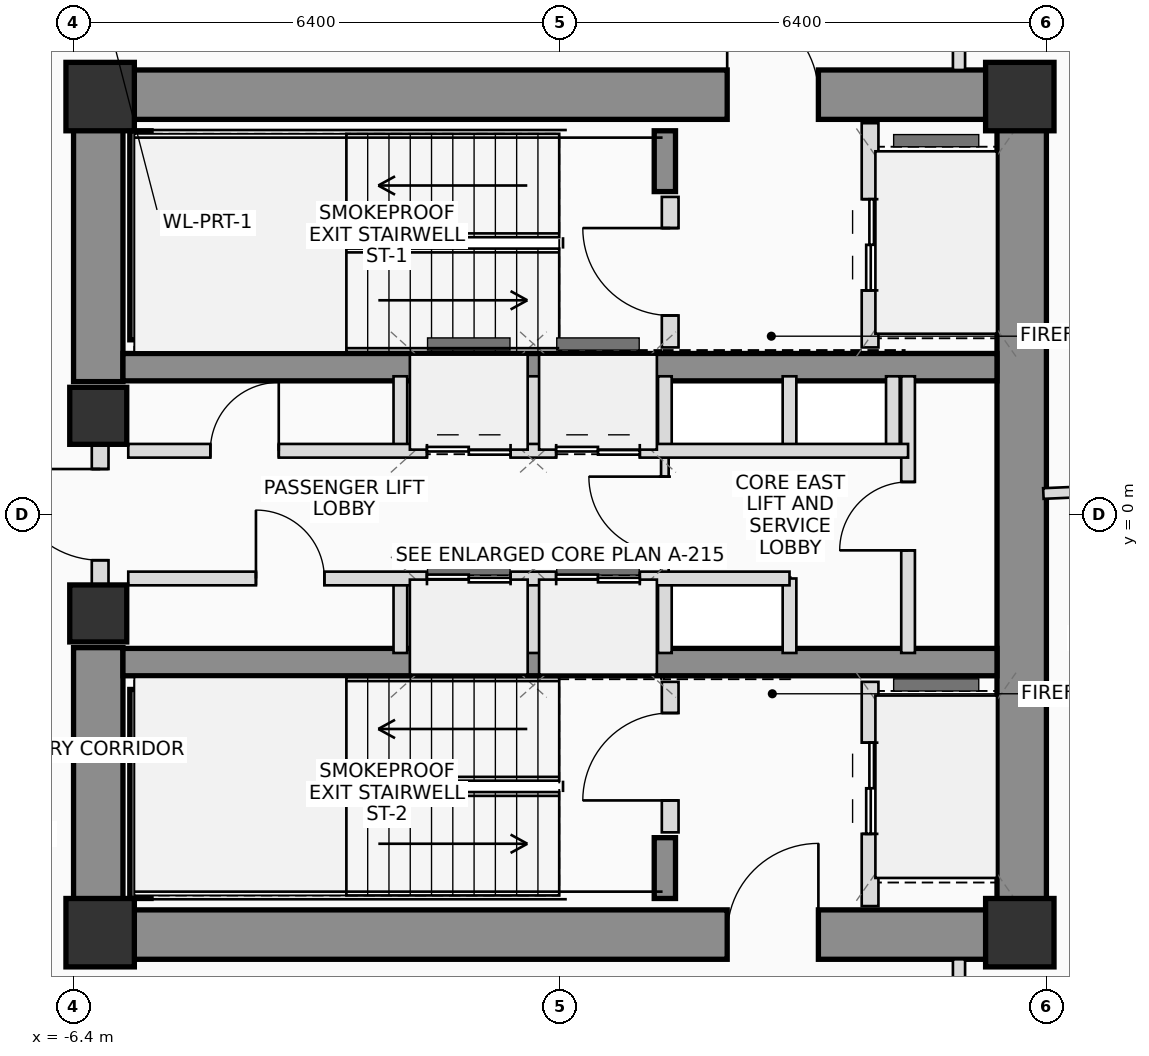
"""IFC4 building model, lengths in metres.
Left out: names, types, materials, properties, quantities, classifications, styles, units other than length and angle.
Written with IfcOpenShell. Run it as: python <this file> out.ifc"""

import sys

from ifc_helpers import new_model, si_unit, direction, frame, frame_2d, origin, origin_2d, place, context, subcontext, project, spatial, rectangle, extrude, source, transform, mapped, element, fill, save


model = new_model("IFC4")
c1 = context("Model", 3, precision=1e-05, world=origin(), true_north=direction((0.0, 1.0)))
c2 = subcontext(c1, "Body", "Model", "MODEL_VIEW")
j1 = project(units=[si_unit("LENGTHUNIT", "METRE"), si_unit("PLANEANGLEUNIT", "RADIAN")], contexts=[c1])
p1 = place(None, origin())
s1 = spatial("IfcSite", under=j1, at=p1, CompositionType="ELEMENT")
p2 = place(p1, origin())
s2 = spatial("IfcBuilding", under=s1, at=p2, CompositionType="ELEMENT")
p3 = place(p2, frame((0.0, 0.0, 158.75)))
s3 = spatial("IfcBuildingStorey", under=s2, at=p3, CompositionType="ELEMENT", Elevation=158.75)
m1 = source(origin(), c2, "Body", "SweptSolid", [
    extrude(rectangle(XDim=0.9, YDim=0.9, at=origin_2d()), origin(), (0.0, 0.0, 1.0), 3.45),
])
for number, where, z_axis, x_axis in (
    (1, (-6.05, -5.5, 0.0), (0.0, 0.0, 1.0), (1.0, 0.0, 0.0)),
    (2, (6.05, -5.5, 0.0), (0.0, 0.0, 1.0), (1.0, 0.0, 0.0)),
    (3, (6.05, 5.5, 0.0), (0.0, 0.0, 1.0), (1.0, 0.0, 0.0)),
    (4, (-6.05, 5.5, 0.0), (0.0, 0.0, 1.0), (1.0, 0.0, 0.0)),
):
    element("IfcColumn", number, at=place(p3, frame(where, z_axis=z_axis, x_axis=x_axis)), inside=s3, PredefinedType="COLUMN", context=c2, shape_type="MappedRepresentation", body=[
        mapped(m1, transform((0.0, 0.0, 0.0), scale=1.0)),
    ])
p4 = place(p3, frame((-6.4, 5.525, 0.0), z_axis=(0.0, 0.0, 1.0), x_axis=(1.0, 0.0, 0.0)))
e5 = element("IfcWall", 5, at=p4, inside=s3, PredefinedType="SHEAR", context=c2, shape_type="SweptSolid", body=[
    extrude(rectangle(XDim=12.8, YDim=0.65, at=frame_2d((6.4, 0.0))), origin(), (0.0, 0.0, 1.0), 3.45),
])
p5 = place(p4, frame((8.6, 0.0, 0.0)))
e6 = element("IfcOpeningElement", 6, at=p5, cuts=e5, PredefinedType="OPENING", context=c2, shape_type="SweptSolid", body=[
    extrude(rectangle(XDim=1.2, YDim=2.2, at=frame_2d((0.6, 1.1))), frame((0.0, 0.335, 0.0), z_axis=(0.0, -1.0, 0.0), x_axis=(1.0, 0.0, 0.0)), (0.0, 0.0, 1.0), 0.67),
])
p6 = place(p3, frame((-6.4, -5.525, 0.0), z_axis=(0.0, 0.0, 1.0), x_axis=(1.0, 0.0, 0.0)))
e7 = element("IfcWall", 7, at=p6, inside=s3, PredefinedType="SHEAR", context=c2, shape_type="SweptSolid", body=[
    extrude(rectangle(XDim=12.8, YDim=0.65, at=frame_2d((6.4, 0.0))), origin(), (0.0, 0.0, 1.0), 3.45),
])
p7 = place(p6, frame((8.6, 0.0, 0.0)))
e8 = element("IfcOpeningElement", 8, at=p7, cuts=e7, PredefinedType="OPENING", context=c2, shape_type="SweptSolid", body=[
    extrude(rectangle(XDim=1.2, YDim=2.2, at=frame_2d((0.6, 1.1))), frame((0.0, 0.335, 0.0), z_axis=(0.0, -1.0, 0.0), x_axis=(1.0, 0.0, 0.0)), (0.0, 0.0, 1.0), 0.67),
])
p8 = place(p3, frame((6.075, -5.2, 0.0), z_axis=(0.0, 0.0, 1.0), x_axis=(0.0, 1.0, 0.0)))
e9 = element("IfcWall", 9, at=p8, inside=s3, PredefinedType="SHEAR", context=c2, shape_type="SweptSolid", body=[
    extrude(rectangle(XDim=10.4, YDim=0.65, at=frame_2d((5.2, 0.0))), origin(), (0.0, 0.0, 1.0), 3.45),
])
for number, where, z_axis, x_axis in (
    (10, (-6.075, -5.2, 0.0), (0.0, 0.0, 1.0), (0.0, 1.0, 0.0)),
    (11, (-6.075, 1.75, 0.0), (0.0, 0.0, 1.0), (0.0, 1.0, 0.0)),
):
    element("IfcWall", number, at=place(p3, frame(where, z_axis=z_axis, x_axis=x_axis)), inside=s3, PredefinedType="SHEAR", context=c2, shape_type="SweptSolid", body=[
        extrude(rectangle(XDim=3.45, YDim=0.65, at=frame_2d((1.725, 0.0))), origin(), (0.0, 0.0, 1.0), 3.45),
    ])
for number, where, z_axis, x_axis in (
    (12, (-5.75, 1.94, 0.0), (0.0, 0.0, 1.0), (1.0, 0.0, 0.0)),
    (13, (-5.75, -1.94, 0.0), (0.0, 0.0, 1.0), (1.0, 0.0, 0.0)),
):
    element("IfcWall", number, at=place(p3, frame(where, z_axis=z_axis, x_axis=x_axis)), inside=s3, PredefinedType="SHEAR", context=c2, shape_type="SweptSolid", body=[
        extrude(rectangle(XDim=11.5, YDim=0.36, at=frame_2d((5.75, 0.0))), origin(), (0.0, 0.0, 1.0), 3.45),
    ])
p9 = place(p3, frame((-5.52, 2.3, 0.0), z_axis=(0.0, 0.0, 1.0), x_axis=(0.0, 1.0, 0.0)))
e14 = element("IfcWall", 14, at=p9, inside=s3, PredefinedType="SHEAR", context=c2, shape_type="SweptSolid", body=[
    extrude(rectangle(XDim=2.75, YDim=0.28, at=frame_2d((1.375, 0.0))), origin(), (0.0, 0.0, 1.0), 3.45),
])
p10 = place(p3, frame((1.38, 4.25, 0.0), z_axis=(0.0, 0.0, 1.0), x_axis=(0.0, 1.0, 0.0)))
e15 = element("IfcWall", 15, at=p10, inside=s3, PredefinedType="SHEAR", context=c2, shape_type="SweptSolid", body=[
    extrude(rectangle(XDim=0.8, YDim=0.28, at=frame_2d((0.4, 0.0))), origin(), (0.0, 0.0, 1.0), 3.45),
])
p11 = place(p3, frame((-5.52, -5.05, 0.0), z_axis=(0.0, 0.0, 1.0), x_axis=(0.0, 1.0, 0.0)))
e16 = element("IfcWall", 16, at=p11, inside=s3, PredefinedType="SHEAR", context=c2, shape_type="SweptSolid", body=[
    extrude(rectangle(XDim=2.75, YDim=0.28, at=frame_2d((1.375, 0.0))), origin(), (0.0, 0.0, 1.0), 3.45),
])
p12 = place(p3, frame((1.38, -5.05, 0.0), z_axis=(0.0, 0.0, 1.0), x_axis=(0.0, 1.0, 0.0)))
e17 = element("IfcWall", 17, at=p12, inside=s3, PredefinedType="SHEAR", context=c2, shape_type="SweptSolid", body=[
    extrude(rectangle(XDim=0.8, YDim=0.28, at=frame_2d((0.4, 0.0))), origin(), (0.0, 0.0, 1.0), 3.45),
])
m2 = source(origin(), c2, "Body", "SweptSolid", [
    extrude(rectangle(XDim=0.75, YDim=0.75, at=origin_2d()), origin(), (0.0, 0.0, 1.0), 3.45),
])
for number, where, z_axis, x_axis in (
    (18, (-6.075, -1.3, 0.0), (0.0, 0.0, 1.0), (1.0, 0.0, 0.0)),
    (19, (-6.075, 1.3, 0.0), (0.0, 0.0, 1.0), (1.0, 0.0, 0.0)),
):
    element("IfcColumn", number, at=place(p3, frame(where, z_axis=z_axis, x_axis=x_axis)), inside=s3, PredefinedType="COLUMN", context=c2, shape_type="MappedRepresentation", body=[
        mapped(m2, transform((0.0, 0.0, 0.0), scale=1.0)),
    ])
p13 = place(p3, frame((-6.05, -0.95, 0.0), z_axis=(0.0, 0.0, 1.0), x_axis=(0.0, 1.0, 0.0)))
e20 = element("IfcWall", 20, at=p13, inside=s3, PredefinedType="PLUMBINGWALL", context=c2, shape_type="SweptSolid", body=[
    extrude(rectangle(XDim=1.9, YDim=0.22, at=frame_2d((0.95, 0.0))), origin(), (0.0, 0.0, 1.0), 2.23),
])
p14 = place(p13, frame((0.35, 0.0, 0.0)))
e21 = element("IfcOpeningElement", 21, at=p14, cuts=e20, PredefinedType="OPENING", context=c2, shape_type="SweptSolid", body=[
    extrude(rectangle(XDim=1.2, YDim=2.2, at=frame_2d((0.6, 1.1))), frame((0.0, 0.12, 0.0), z_axis=(0.0, -1.0, 0.0), x_axis=(1.0, 0.0, 0.0)), (0.0, 0.0, 1.0), 0.24),
])
p15 = place(p3, frame((1.45, 2.2, 0.0), z_axis=(0.0, 0.0, 1.0), x_axis=(0.0, 1.0, 0.0)))
e22 = element("IfcWall", 22, at=p15, inside=s3, PredefinedType="PLUMBINGWALL", context=c2, shape_type="SweptSolid", body=[
    extrude(rectangle(XDim=1.98, YDim=0.22, at=frame_2d((0.99, 0.0))), origin(), (0.0, 0.0, 1.0), 3.25),
])
p16 = place(p15, frame((0.42, 0.0, 0.0)))
e23 = element("IfcOpeningElement", 23, at=p16, cuts=e22, PredefinedType="OPENING", context=c2, shape_type="SweptSolid", body=[
    extrude(rectangle(XDim=1.15, YDim=2.15, at=frame_2d((0.575, 1.075))), frame((0.0, 0.12, 0.0), z_axis=(0.0, -1.0, 0.0), x_axis=(1.0, 0.0, 0.0)), (0.0, 0.0, 1.0), 0.24),
])
p17 = place(p3, frame((4.08, 2.2, 0.0), z_axis=(0.0, 0.0, 1.0), x_axis=(0.0, 1.0, 0.0)))
e24 = element("IfcWall", 24, at=p17, inside=s3, PredefinedType="PLUMBINGWALL", context=c2, shape_type="SweptSolid", body=[
    extrude(rectangle(XDim=2.95, YDim=0.22, at=frame_2d((1.475, 0.0))), origin(), (0.0, 0.0, 1.0), 3.25),
])
p18 = place(p17, frame((0.75, 0.0, 0.0)))
e25 = element("IfcOpeningElement", 25, at=p18, cuts=e24, PredefinedType="OPENING", context=c2, shape_type="SweptSolid", body=[
    extrude(rectangle(XDim=1.2, YDim=2.25, at=frame_2d((0.6, 1.125))), frame((0.0, 0.12, 0.0), z_axis=(0.0, -1.0, 0.0), x_axis=(1.0, 0.0, 0.0)), (0.0, 0.0, 1.0), 0.24),
])
p19 = place(p3, frame((1.45, -4.18, 0.0), z_axis=(0.0, 0.0, 1.0), x_axis=(0.0, 1.0, 0.0)))
e26 = element("IfcWall", 26, at=p19, inside=s3, PredefinedType="PLUMBINGWALL", context=c2, shape_type="SweptSolid", body=[
    extrude(rectangle(XDim=1.98, YDim=0.22, at=frame_2d((0.99, 0.0))), origin(), (0.0, 0.0, 1.0), 3.25),
])
p20 = place(p19, frame((0.42, 0.0, 0.0)))
e27 = element("IfcOpeningElement", 27, at=p20, cuts=e26, PredefinedType="OPENING", context=c2, shape_type="SweptSolid", body=[
    extrude(rectangle(XDim=1.15, YDim=2.15, at=frame_2d((0.575, 1.075))), frame((0.0, 0.12, 0.0), z_axis=(0.0, -1.0, 0.0), x_axis=(1.0, 0.0, 0.0)), (0.0, 0.0, 1.0), 0.24),
])
p21 = place(p3, frame((4.08, -5.15, 0.0), z_axis=(0.0, 0.0, 1.0), x_axis=(0.0, 1.0, 0.0)))
e28 = element("IfcWall", 28, at=p21, inside=s3, PredefinedType="PLUMBINGWALL", context=c2, shape_type="SweptSolid", body=[
    extrude(rectangle(XDim=2.95, YDim=0.22, at=frame_2d((1.475, 0.0))), origin(), (0.0, 0.0, 1.0), 3.25),
])
p22 = place(p21, frame((0.95, 0.0, 0.0)))
e29 = element("IfcOpeningElement", 29, at=p22, cuts=e28, PredefinedType="OPENING", context=c2, shape_type="SweptSolid", body=[
    extrude(rectangle(XDim=1.2, YDim=2.25, at=frame_2d((0.6, 1.125))), frame((0.0, 0.12, 0.0), z_axis=(0.0, -1.0, 0.0), x_axis=(1.0, 0.0, 0.0)), (0.0, 0.0, 1.0), 0.24),
])
p23 = place(p3, frame((1.38, -0.84, 0.0), z_axis=(0.0, 0.0, 1.0), x_axis=(0.0, 1.0, 0.0)))
e30 = element("IfcWall", 30, at=p23, inside=s3, PredefinedType="PARTITIONING", context=c2, shape_type="SweptSolid", body=[
    extrude(rectangle(XDim=1.68, YDim=0.1, at=frame_2d((0.84, 0.0))), origin(), (0.0, 0.0, 1.0), 3.25),
])
p24 = place(p23, frame((0.34, 0.0, 0.0)))
e31 = element("IfcOpeningElement", 31, at=p24, cuts=e30, PredefinedType="OPENING", context=c2, shape_type="SweptSolid", body=[
    extrude(rectangle(XDim=1.0, YDim=2.25, at=frame_2d((0.5, 1.125))), frame((0.0, 0.06, 0.0), z_axis=(0.0, -1.0, 0.0), x_axis=(1.0, 0.0, 0.0)), (0.0, 0.0, 1.0), 0.12),
])
for number, where, z_axis, x_axis in (
    (32, (-2.1, 0.84, 0.0), (0.0, 0.0, 1.0), (0.0, 1.0, 0.0)),
    (33, (-2.1, -1.82, 0.0), (0.0, 0.0, 1.0), (0.0, 1.0, 0.0)),
    (34, (-0.35, 0.84, 0.0), (0.0, 0.0, 1.0), (0.0, 1.0, 0.0)),
    (35, (-0.35, -1.82, 0.0), (0.0, 0.0, 1.0), (0.0, 1.0, 0.0)),
    (36, (1.38, 0.84, 0.0), (0.0, 0.0, 1.0), (0.0, 1.0, 0.0)),
    (37, (1.38, -1.82, 0.0), (0.0, 0.0, 1.0), (0.0, 1.0, 0.0)),
    (38, (3.02, 0.84, 0.0), (0.0, 0.0, 1.0), (0.0, 1.0, 0.0)),
    (39, (4.38, 0.84, 0.0), (0.0, 0.0, 1.0), (0.0, 1.0, 0.0)),
    (40, (3.02, -1.82, 0.0), (0.0, 0.0, 1.0), (0.0, 1.0, 0.0)),
):
    element("IfcWall", number, at=place(p3, frame(where, z_axis=z_axis, x_axis=x_axis)), inside=s3, PredefinedType="PLUMBINGWALL", context=c2, shape_type="SweptSolid", body=[
        extrude(rectangle(XDim=0.98, YDim=0.18, at=frame_2d((0.49, 0.0))), origin(), (0.0, 0.0, 1.0), 3.25),
    ])
p25 = place(p3, frame((4.58, -1.82, 0.0), z_axis=(0.0, 0.0, 1.0), x_axis=(0.0, 1.0, 0.0)))
e41 = element("IfcWall", 41, at=p25, inside=s3, PredefinedType="PLUMBINGWALL", context=c2, shape_type="SweptSolid", body=[
    extrude(rectangle(XDim=3.64, YDim=0.18, at=frame_2d((1.82, 0.0))), origin(), (0.0, 0.0, 1.0), 3.25),
])
p26 = place(p25, frame((1.35, 0.0, 0.0)))
e42 = element("IfcOpeningElement", 42, at=p26, cuts=e41, PredefinedType="OPENING", context=c2, shape_type="SweptSolid", body=[
    extrude(rectangle(XDim=0.9, YDim=2.05, at=frame_2d((0.45, 1.025))), frame((0.0, 0.1, 0.0), z_axis=(0.0, -1.0, 0.0), x_axis=(1.0, 0.0, 0.0)), (0.0, 0.0, 1.0), 0.2),
])
p27 = place(p3, frame((-5.68, 0.84, 0.0), z_axis=(0.0, 0.0, 1.0), x_axis=(1.0, 0.0, 0.0)))
e43 = element("IfcWall", 43, at=p27, inside=s3, PredefinedType="PLUMBINGWALL", context=c2, shape_type="SweptSolid", body=[
    extrude(rectangle(XDim=10.26, YDim=0.18, at=frame_2d((5.13, 0.0))), origin(), (0.0, 0.0, 1.0), 3.25),
])
p28 = place(p27, frame((1.08, 0.0, 0.0)))
e44 = element("IfcOpeningElement", 44, at=p28, cuts=e43, PredefinedType="OPENING", context=c2, shape_type="SweptSolid", body=[
    extrude(rectangle(XDim=0.9, YDim=2.05, at=frame_2d((0.45, 1.025))), frame((0.0, 0.1, 0.0), z_axis=(0.0, -1.0, 0.0), x_axis=(1.0, 0.0, 0.0)), (0.0, 0.0, 1.0), 0.2),
])
p29 = place(p27, frame((3.93, 0.0, 0.0)))
e45 = element("IfcOpeningElement", 45, at=p29, cuts=e43, PredefinedType="OPENING", context=c2, shape_type="SweptSolid", body=[
    extrude(rectangle(XDim=1.1, YDim=2.2, at=frame_2d((0.55, 1.1))), frame((0.0, 0.1, 0.0), z_axis=(0.0, -1.0, 0.0), x_axis=(1.0, 0.0, 0.0)), (0.0, 0.0, 1.0), 0.2),
])
p30 = place(p27, frame((5.63, 0.0, 0.0)))
e46 = element("IfcOpeningElement", 46, at=p30, cuts=e43, PredefinedType="OPENING", context=c2, shape_type="SweptSolid", body=[
    extrude(rectangle(XDim=1.1, YDim=2.2, at=frame_2d((0.55, 1.1))), frame((0.0, 0.1, 0.0), z_axis=(0.0, -1.0, 0.0), x_axis=(1.0, 0.0, 0.0)), (0.0, 0.0, 1.0), 0.2),
])
p31 = place(p3, frame((-5.68, -0.84, 0.0), z_axis=(0.0, 0.0, 1.0), x_axis=(1.0, 0.0, 0.0)))
e47 = element("IfcWall", 47, at=p31, inside=s3, PredefinedType="PLUMBINGWALL", context=c2, shape_type="SweptSolid", body=[
    extrude(rectangle(XDim=8.7, YDim=0.18, at=frame_2d((4.35, 0.0))), origin(), (0.0, 0.0, 1.0), 3.25),
])
p32 = place(p31, frame((1.68, 0.0, 0.0)))
e48 = element("IfcOpeningElement", 48, at=p32, cuts=e47, PredefinedType="OPENING", context=c2, shape_type="SweptSolid", body=[
    extrude(rectangle(XDim=0.9, YDim=2.05, at=frame_2d((0.45, 1.025))), frame((0.0, 0.1, 0.0), z_axis=(0.0, -1.0, 0.0), x_axis=(1.0, 0.0, 0.0)), (0.0, 0.0, 1.0), 0.2),
])
p33 = place(p31, frame((3.93, 0.0, 0.0)))
e49 = element("IfcOpeningElement", 49, at=p33, cuts=e47, PredefinedType="OPENING", context=c2, shape_type="SweptSolid", body=[
    extrude(rectangle(XDim=1.1, YDim=2.2, at=frame_2d((0.55, 1.1))), frame((0.0, 0.1, 0.0), z_axis=(0.0, -1.0, 0.0), x_axis=(1.0, 0.0, 0.0)), (0.0, 0.0, 1.0), 0.2),
])
p34 = place(p31, frame((5.63, 0.0, 0.0)))
e50 = element("IfcOpeningElement", 50, at=p34, cuts=e47, PredefinedType="OPENING", context=c2, shape_type="SweptSolid", body=[
    extrude(rectangle(XDim=1.1, YDim=2.2, at=frame_2d((0.55, 1.1))), frame((0.0, 0.1, 0.0), z_axis=(0.0, -1.0, 0.0), x_axis=(1.0, 0.0, 0.0)), (0.0, 0.0, 1.0), 0.2),
])
for number, where, z_axis, x_axis in (
    (51, (5.25, 7.5, 0.0), (0.0, 0.0, 1.0), (0.0, -1.0, 0.0)),
    (52, (5.25, -5.85, 0.0), (0.0, 0.0, 1.0), (0.0, -1.0, 0.0)),
):
    element("IfcWall", number, at=place(p3, frame(where, z_axis=z_axis, x_axis=x_axis)), inside=s3, PredefinedType="PARTITIONING", context=c2, shape_type="SweptSolid", body=[
        extrude(rectangle(XDim=1.65, YDim=0.16, at=frame_2d((0.825, 0.0))), origin(), (0.0, 0.0, 1.0), 3.25),
    ])
p35 = place(p3, frame((6.36, 0.278, 0.0), z_axis=(0.0, 0.0, 1.0), x_axis=(0.999047543566, 0.043634913719, 0.0)))
e53 = element("IfcWall", 53, at=p35, inside=s3, PredefinedType="PARTITIONING", context=c2, shape_type="SweptSolid", body=[
    extrude(rectangle(XDim=7.503, YDim=0.14, at=frame_2d((3.751, 0.0))), origin(), (0.0, 0.0, 1.0), 2.605),
])
p36 = place(p5, origin())
e54 = element("IfcDoor", 54, at=p36, inside=s3, OperationType="SINGLE_SWING_LEFT", PredefinedType="DOOR", context=c2, shape_type="SweptSolid", body=[
    extrude(rectangle(XDim=1.2, YDim=2.2, at=frame_2d((0.6, 1.1))), frame((0.0, 0.025, 0.0), z_axis=(0.0, -1.0, 0.0), x_axis=(1.0, 0.0, 0.0)), (0.0, 0.0, 1.0), 0.05),
])
fill(e6, e54)
p37 = place(p7, origin())
e55 = element("IfcDoor", 55, at=p37, inside=s3, OperationType="SINGLE_SWING_RIGHT", PredefinedType="DOOR", context=c2, shape_type="SweptSolid", body=[
    extrude(rectangle(XDim=1.2, YDim=2.2, at=frame_2d((0.6, 1.1))), frame((0.0, 0.025, 0.0), z_axis=(0.0, -1.0, 0.0), x_axis=(1.0, 0.0, 0.0)), (0.0, 0.0, 1.0), 0.05),
])
fill(e8, e55)
p38 = place(p14, origin())
e56 = element("IfcDoor", 56, at=p38, inside=s3, OperationType="SINGLE_SWING_RIGHT", PredefinedType="DOOR", context=c2, shape_type="SweptSolid", body=[
    extrude(rectangle(XDim=1.2, YDim=2.2, at=frame_2d((0.6, 1.1))), frame((0.0, 0.025, 0.0), z_axis=(0.0, -1.0, 0.0), x_axis=(1.0, 0.0, 0.0)), (0.0, 0.0, 1.0), 0.05),
])
fill(e21, e56)
p39 = place(p16, origin())
e57 = element("IfcDoor", 57, at=p39, inside=s3, OperationType="SINGLE_SWING_RIGHT", PredefinedType="DOOR", context=c2, shape_type="SweptSolid", body=[
    extrude(rectangle(XDim=1.15, YDim=2.15, at=frame_2d((0.575, 1.075))), frame((0.0, 0.025, 0.0), z_axis=(0.0, -1.0, 0.0), x_axis=(1.0, 0.0, 0.0)), (0.0, 0.0, 1.0), 0.05),
])
fill(e23, e57)
p40 = place(p18, origin())
e58 = element("IfcDoor", 58, at=p40, inside=s3, OperationType="DOUBLE_DOOR_SLIDING", PredefinedType="DOOR", context=c2, shape_type="SweptSolid", body=[
    extrude(rectangle(XDim=1.2, YDim=2.25, at=frame_2d((0.6, 1.125))), frame((0.0, 0.025, 0.0), z_axis=(0.0, -1.0, 0.0), x_axis=(1.0, 0.0, 0.0)), (0.0, 0.0, 1.0), 0.05),
])
fill(e25, e58)
p41 = place(p20, origin())
e59 = element("IfcDoor", 59, at=p41, inside=s3, OperationType="SINGLE_SWING_LEFT", PredefinedType="DOOR", context=c2, shape_type="SweptSolid", body=[
    extrude(rectangle(XDim=1.15, YDim=2.15, at=frame_2d((0.575, 1.075))), frame((0.0, 0.025, 0.0), z_axis=(0.0, -1.0, 0.0), x_axis=(1.0, 0.0, 0.0)), (0.0, 0.0, 1.0), 0.05),
])
fill(e27, e59)
p42 = place(p22, origin())
e60 = element("IfcDoor", 60, at=p42, inside=s3, OperationType="DOUBLE_DOOR_SLIDING", PredefinedType="DOOR", context=c2, shape_type="SweptSolid", body=[
    extrude(rectangle(XDim=1.2, YDim=2.25, at=frame_2d((0.6, 1.125))), frame((0.0, 0.025, 0.0), z_axis=(0.0, -1.0, 0.0), x_axis=(1.0, 0.0, 0.0)), (0.0, 0.0, 1.0), 0.05),
])
fill(e29, e60)
p43 = place(p24, origin())
e61 = element("IfcDoor", 61, at=p43, inside=s3, OperationType="SINGLE_SWING_RIGHT", PredefinedType="DOOR", context=c2, shape_type="SweptSolid", body=[
    extrude(rectangle(XDim=1.0, YDim=2.25, at=frame_2d((0.5, 1.125))), frame((0.0, 0.025, 0.0), z_axis=(0.0, -1.0, 0.0), x_axis=(1.0, 0.0, 0.0)), (0.0, 0.0, 1.0), 0.05),
])
fill(e31, e61)
p44 = place(p26, origin())
e62 = element("IfcDoor", 62, at=p44, inside=s3, OperationType="SINGLE_SWING_LEFT", PredefinedType="DOOR", context=c2, shape_type="SweptSolid", body=[
    extrude(rectangle(XDim=0.9, YDim=2.05, at=frame_2d((0.45, 1.025))), frame((0.0, 0.025, 0.0), z_axis=(0.0, -1.0, 0.0), x_axis=(1.0, 0.0, 0.0)), (0.0, 0.0, 1.0), 0.05),
])
fill(e42, e62)
p45 = place(p28, origin())
e63 = element("IfcDoor", 63, at=p45, inside=s3, OperationType="SINGLE_SWING_RIGHT", PredefinedType="DOOR", context=c2, shape_type="SweptSolid", body=[
    extrude(rectangle(XDim=0.9, YDim=2.05, at=frame_2d((0.45, 1.025))), frame((0.0, 0.025, 0.0), z_axis=(0.0, -1.0, 0.0), x_axis=(1.0, 0.0, 0.0)), (0.0, 0.0, 1.0), 0.05),
])
fill(e44, e63)
p46 = place(p29, origin())
e64 = element("IfcDoor", 64, at=p46, inside=s3, OperationType="DOUBLE_DOOR_SLIDING", PredefinedType="DOOR", context=c2, shape_type="SweptSolid", body=[
    extrude(rectangle(XDim=1.1, YDim=2.2, at=frame_2d((0.55, 1.1))), frame((0.0, 0.025, 0.0), z_axis=(0.0, -1.0, 0.0), x_axis=(1.0, 0.0, 0.0)), (0.0, 0.0, 1.0), 0.05),
])
fill(e45, e64)
p47 = place(p30, origin())
e65 = element("IfcDoor", 65, at=p47, inside=s3, OperationType="DOUBLE_DOOR_SLIDING", PredefinedType="DOOR", context=c2, shape_type="SweptSolid", body=[
    extrude(rectangle(XDim=1.1, YDim=2.2, at=frame_2d((0.55, 1.1))), frame((0.0, 0.025, 0.0), z_axis=(0.0, -1.0, 0.0), x_axis=(1.0, 0.0, 0.0)), (0.0, 0.0, 1.0), 0.05),
])
fill(e46, e65)
p48 = place(p32, origin())
e66 = element("IfcDoor", 66, at=p48, inside=s3, OperationType="SINGLE_SWING_LEFT", PredefinedType="DOOR", context=c2, shape_type="SweptSolid", body=[
    extrude(rectangle(XDim=0.9, YDim=2.05, at=frame_2d((0.45, 1.025))), frame((0.0, 0.025, 0.0), z_axis=(0.0, -1.0, 0.0), x_axis=(1.0, 0.0, 0.0)), (0.0, 0.0, 1.0), 0.05),
])
fill(e48, e66)
p49 = place(p33, origin())
e67 = element("IfcDoor", 67, at=p49, inside=s3, OperationType="DOUBLE_DOOR_SLIDING", PredefinedType="DOOR", context=c2, shape_type="SweptSolid", body=[
    extrude(rectangle(XDim=1.1, YDim=2.2, at=frame_2d((0.55, 1.1))), frame((0.0, 0.025, 0.0), z_axis=(0.0, -1.0, 0.0), x_axis=(1.0, 0.0, 0.0)), (0.0, 0.0, 1.0), 0.05),
])
fill(e49, e67)
p50 = place(p34, origin())
e68 = element("IfcDoor", 68, at=p50, inside=s3, OperationType="DOUBLE_DOOR_SLIDING", PredefinedType="DOOR", context=c2, shape_type="SweptSolid", body=[
    extrude(rectangle(XDim=1.1, YDim=2.2, at=frame_2d((0.55, 1.1))), frame((0.0, 0.025, 0.0), z_axis=(0.0, -1.0, 0.0), x_axis=(1.0, 0.0, 0.0)), (0.0, 0.0, 1.0), 0.05),
])
fill(e50, e68)
save(model, sys.argv[1])
